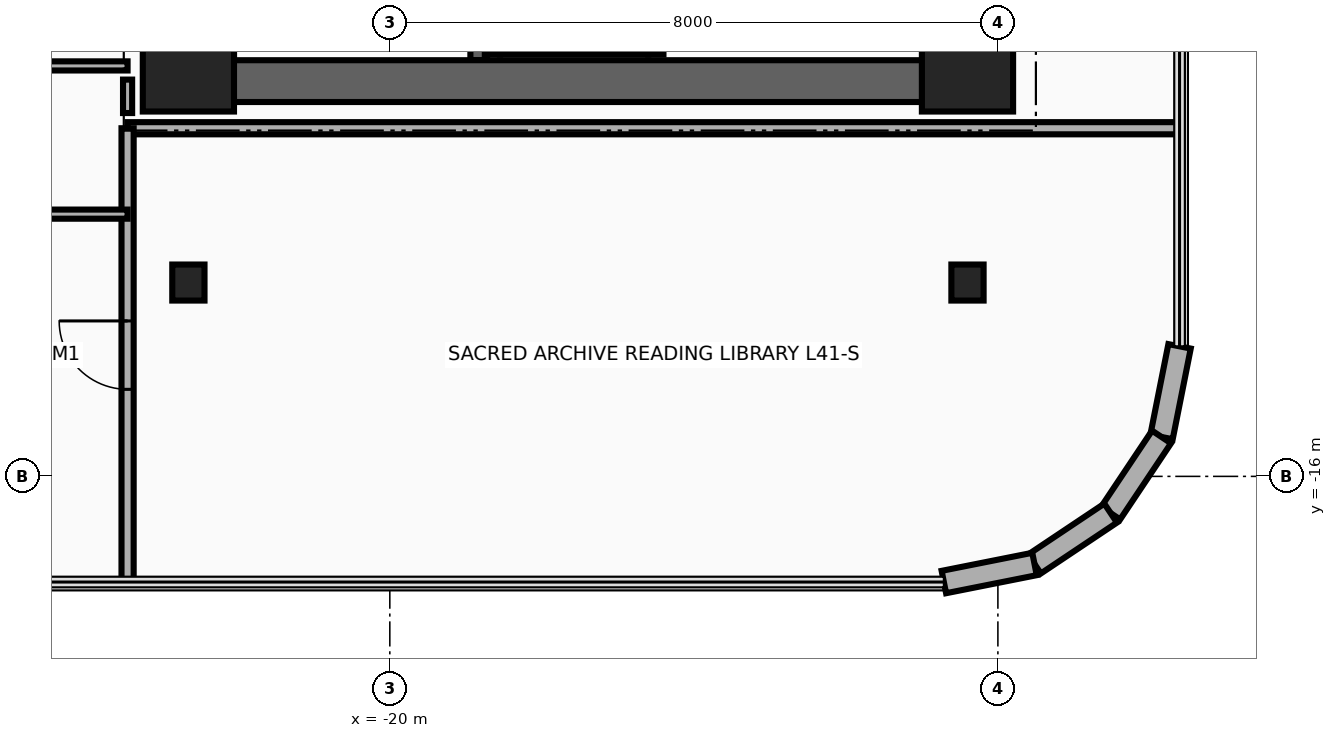
"""IFC4 building model, lengths in metres.
Left out: names, types, materials, properties, quantities, classifications, styles, units other than length and angle.
Written with IfcOpenShell. Run it as: python <this file> out.ifc"""

import sys

from ifc_helpers import new_model, si_unit, direction, frame, frame_2d, origin, origin_2d, place, context, subcontext, project, spatial, rectangle, i_section, extrude, source, transform, mapped, element, fill, save


model = new_model("IFC4")
c1 = context("Model", 3, precision=1e-05, world=origin(), true_north=direction((0.0, 1.0)))
c2 = subcontext(c1, "Body", "Model", "MODEL_VIEW")
j1 = project(units=[si_unit("LENGTHUNIT", "METRE"), si_unit("PLANEANGLEUNIT", "RADIAN")], contexts=[c1])
p1 = place(None, origin())
s1 = spatial("IfcSite", under=j1, at=p1, CompositionType="ELEMENT")
p2 = place(p1, origin())
s2 = spatial("IfcBuilding", under=s1, at=p2, CompositionType="ELEMENT")
p3 = place(p2, frame((0.0, 0.0, 161.2)))
s3 = spatial("IfcBuildingStorey", under=s2, at=p3, CompositionType="ELEMENT", Elevation=161.2)
for number, where, z_axis, x_axis in (
    (1, (-22.16, -10.525, 0.0), (0.0, 0.0, 1.0), (0.0, 1.0, 0.0)),
    (2, (-18.83, -10.525, 0.0), (0.0, 0.0, 1.0), (0.0, 1.0, 0.0)),
):
    element("IfcWall", number, at=place(p3, frame(where, z_axis=z_axis, x_axis=x_axis)), inside=s3, PredefinedType="SHEAR", context=c2, shape_type="SweptSolid", body=[
        extrude(rectangle(XDim=8.745, YDim=0.22, at=frame_2d((4.373, 0.0))), origin(), (0.0, 0.0, 1.0), 3.46),
    ])
p4 = place(p3, frame((-22.65, -11.075, 0.0), z_axis=(0.0, 0.0, 1.0), x_axis=(0.0, 1.0, 0.0)))
e3 = element("IfcWall", 3, at=p4, inside=s3, PredefinedType="SHEAR", context=c2, shape_type="SweptSolid", body=[
    extrude(rectangle(XDim=22.15, YDim=0.55, at=frame_2d((11.075, 0.0))), origin(), (0.0, 0.0, 1.0), 3.46),
])
p5 = place(p3, frame((-22.65, -10.8, 0.0), z_axis=(0.0, 0.0, 1.0), x_axis=(1.0, 0.0, 0.0)))
e4 = element("IfcWall", 4, at=p5, inside=s3, PredefinedType="SHEAR", context=c2, shape_type="SweptSolid", body=[
    extrude(rectangle(XDim=10.25, YDim=0.55, at=frame_2d((5.125, 0.0))), origin(), (0.0, 0.0, 1.0), 3.46),
])
m1 = source(origin(), c2, "Body", "SweptSolid", [
    extrude(rectangle(XDim=1.2, YDim=1.2, at=origin_2d()), origin(), (0.0, 0.0, 1.0), 3.7),
])
for number, where, z_axis, x_axis in (
    (5, (-22.65, -10.6, 0.0), (0.0, 0.0, 1.0), (1.0, 0.0, 0.0)),
    (6, (-12.4, -10.6, 0.0), (0.0, 0.0, 1.0), (1.0, 0.0, 0.0)),
):
    element("IfcColumn", number, at=place(p3, frame(where, z_axis=z_axis, x_axis=x_axis)), inside=s3, PredefinedType="COLUMN", context=c2, shape_type="MappedRepresentation", body=[
        mapped(m1, transform((0.0, 0.0, 0.0), x_axis=(1.0, 0.0, 0.0), y_axis=(0.0, 1.0, 0.0), z_axis=(0.0, 0.0, 1.0), scale=1.0)),
    ])
m2 = source(origin(), c2, "Body", "SweptSolid", [
    extrude(i_section(OverallWidth=0.424, OverallDepth=0.474, WebThickness=0.048, FlangeThickness=0.077, at=origin_2d()), origin(), (0.0, 0.0, 1.0), 3.7),
])
for number, where, z_axis, x_axis in (
    (7, (-22.65, -13.45, 0.0), (0.0, 0.0, 1.0), (1.0, 0.0, 0.0)),
    (8, (-12.4, -13.45, 0.0), (0.0, 0.0, 1.0), (1.0, 0.0, 0.0)),
):
    element("IfcColumn", number, at=place(p3, frame(where, z_axis=z_axis, x_axis=x_axis)), inside=s3, PredefinedType="COLUMN", context=c2, shape_type="MappedRepresentation", body=[
        mapped(m2, transform((0.0, 0.0, 0.0), x_axis=(1.0, 0.0, 0.0), y_axis=(0.0, 1.0, 0.0), z_axis=(0.0, 0.0, 1.0), scale=1.0)),
    ])
p6 = place(p3, frame((-9.61, -14.289, 0.0), z_axis=(0.0, 0.0, 1.0), x_axis=(-0.194996050505, -0.980804027463, 0.0)))
e9 = element("IfcWall", 9, at=p6, inside=s3, PredefinedType="SOLIDWALL", context=c2, shape_type="SweptSolid", body=[
    extrude(rectangle(XDim=1.216, YDim=0.3, at=frame_2d((0.608, 0.0))), origin(), (0.0, 0.0, 1.0), 3.46),
])
for number, where, z_axis, x_axis in (
    (10, (-9.847, -15.482, 0.0), (0.0, 0.0, 1.0), (-0.556, -0.831, 0.0)),
    (11, (-10.517, -16.483, 0.0), (0.0, 0.0, 1.0), (-0.831, -0.556, 0.0)),
):
    element("IfcWall", number, at=place(p3, frame(where, z_axis=z_axis, x_axis=x_axis)), inside=s3, PredefinedType="SOLIDWALL", context=c2, shape_type="SweptSolid", body=[
        extrude(rectangle(XDim=1.205, YDim=0.3, at=frame_2d((0.603, 0.0))), origin(), (0.0, 0.0, 1.0), 3.46),
    ])
p7 = place(p3, frame((-11.518, -17.153, 0.0), z_axis=(0.0, 0.0, 1.0), x_axis=(-0.980804027463, -0.194996050505, 0.0)))
e12 = element("IfcWall", 12, at=p7, inside=s3, PredefinedType="SOLIDWALL", context=c2, shape_type="SweptSolid", body=[
    extrude(rectangle(XDim=1.216, YDim=0.3, at=frame_2d((0.608, 0.0))), origin(), (0.0, 0.0, 1.0), 3.46),
])
for number, where, z_axis, x_axis in (
    (13, (-18.65, -10.45, 0.0), (0.0, 0.0, 1.0), (0.0, 1.0, 0.0)),
    (14, (-16.5, -10.45, 0.0), (0.0, 0.0, 1.0), (0.0, 1.0, 0.0)),
):
    element("IfcWall", number, at=place(p3, frame(where, z_axis=z_axis, x_axis=x_axis)), inside=s3, PredefinedType="MOVABLE", context=c2, shape_type="SweptSolid", body=[
        extrude(rectangle(XDim=2.35, YDim=0.2, at=frame_2d((1.175, 0.0))), origin(), (0.0, 0.0, 1.0), 2.666),
    ])
p8 = place(p3, frame((-18.55, -10.35, 0.0), z_axis=(0.0, 0.0, 1.0), x_axis=(1.0, 0.0, 0.0)))
e15 = element("IfcWall", 15, at=p8, inside=s3, PredefinedType="MOVABLE", context=c2, shape_type="SweptSolid", body=[
    extrude(rectangle(XDim=1.95, YDim=0.2, at=frame_2d((0.975, 0.0))), origin(), (0.0, 0.0, 1.0), 2.666),
])
p9 = place(p3, frame((-23.45, -11.42, 0.0), z_axis=(0.0, 0.0, 1.0), x_axis=(1.0, 0.0, 0.0)))
e16 = element("IfcWall", 16, at=p9, inside=s3, PredefinedType="PARTITIONING", context=c2, shape_type="SweptSolid", body=[
    extrude(rectangle(XDim=13.84, YDim=0.16, at=frame_2d((6.92, 0.0))), origin(), (0.0, 0.0, 1.0), 2.834),
])
p10 = place(p3, frame((-23.45, -17.39, 0.0), z_axis=(0.0, 0.0, 1.0), x_axis=(0.0, 1.0, 0.0)))
e17 = element("IfcWall", 17, at=p10, inside=s3, PredefinedType="PARTITIONING", context=c2, shape_type="SweptSolid", body=[
    extrude(rectangle(XDim=5.97, YDim=0.16, at=frame_2d((2.985, 0.0))), origin(), (0.0, 0.0, 1.0), 3.46),
])
p11 = place(p10, frame((2.535, 0.0, 0.0)))
e18 = element("IfcOpeningElement", 18, at=p11, cuts=e17, PredefinedType="OPENING", context=c2, shape_type="SweptSolid", body=[
    extrude(rectangle(XDim=0.9, YDim=2.1, at=frame_2d((0.45, 1.05))), frame((0.0, 0.095, 0.0), z_axis=(0.0, -1.0, 0.0), x_axis=(1.0, 0.0, 0.0)), (0.0, 0.0, 1.0), 0.19),
])
p12 = place(p3, frame((-26.708, -10.6, 0.0), z_axis=(0.0, 0.0, 1.0), x_axis=(1.0, 0.0, 0.0)))
e19 = element("IfcWall", 19, at=p12, inside=s3, PredefinedType="PARTITIONING", context=c2, shape_type="SweptSolid", body=[
    extrude(rectangle(XDim=3.259, YDim=0.12, at=frame_2d((1.629, 0.0))), origin(), (0.0, 0.0, 1.0), 2.666),
])
p13 = place(p3, frame((-26.708, -12.55, 0.0), z_axis=(0.0, 0.0, 1.0), x_axis=(1.0, 0.0, 0.0)))
e20 = element("IfcWall", 20, at=p13, inside=s3, PredefinedType="PARTITIONING", context=c2, shape_type="SweptSolid", body=[
    extrude(rectangle(XDim=3.259, YDim=0.12, at=frame_2d((1.629, 0.0))), origin(), (0.0, 0.0, 1.0), 3.46),
])
p14 = place(p3, frame((-23.45, -11.22, 0.0), z_axis=(0.0, 0.0, 1.0), x_axis=(0.0, 1.0, 0.0)))
e21 = element("IfcWall", 21, at=p14, inside=s3, PredefinedType="PARTITIONING", context=c2, shape_type="SweptSolid", body=[
    extrude(rectangle(XDim=0.44, YDim=0.12, at=frame_2d((0.22, 0.0))), origin(), (0.0, 0.0, 1.0), 2.666),
])
p15 = place(p11, origin())
e22 = element("IfcDoor", 22, at=p15, inside=s3, OperationType="SINGLE_SWING_RIGHT", PredefinedType="DOOR", context=c2, shape_type="SweptSolid", body=[
    extrude(rectangle(XDim=0.9, YDim=2.1, at=frame_2d((0.45, 1.05))), frame((0.0, 0.025, 0.0), z_axis=(0.0, -1.0, 0.0), x_axis=(1.0, 0.0, 0.0)), (0.0, 0.0, 1.0), 0.05),
])
fill(e18, e22)
save(model, sys.argv[1])
